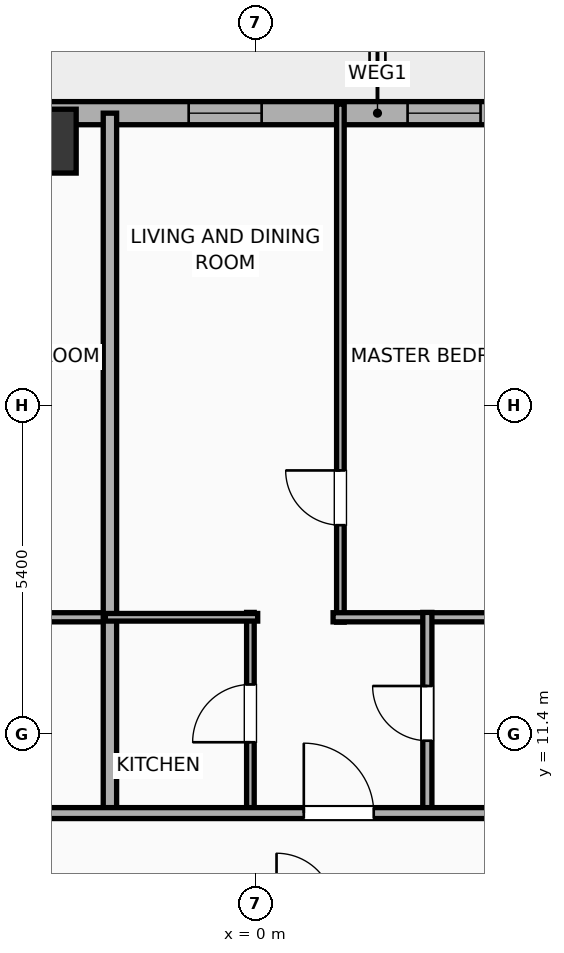
"""IFC4 building model, lengths in metres.
Left out: names, types, materials, properties, quantities, classifications, styles, units other than length and angle.
Written with IfcOpenShell. Run it as: python <this file> out.ifc"""

import sys

from ifc_helpers import new_model, si_unit, direction, frame, frame_2d, origin, origin_2d, place, context, subcontext, project, spatial, rectangle, hollow_rectangle, extrude, element, fill, save


model = new_model("IFC4")
c1 = context("Model", 3, precision=1e-05, world=origin(), true_north=direction((0.0, 1.0)))
c2 = subcontext(c1, "Body", "Model", "MODEL_VIEW")
j1 = project(units=[si_unit("LENGTHUNIT", "METRE"), si_unit("PLANEANGLEUNIT", "RADIAN")], contexts=[c1])
p1 = place(None, origin())
s1 = spatial("IfcSite", under=j1, at=p1, CompositionType="ELEMENT")
p2 = place(p1, origin())
s2 = spatial("IfcBuilding", under=s1, at=p2, CompositionType="ELEMENT")
p3 = place(p2, frame((0.0, 0.0, 113.1)))
s3 = spatial("IfcBuildingStorey", under=s2, at=p3, CompositionType="ELEMENT", Elevation=113.1)
p4 = place(p3, frame((-3.48, 21.15, 0.0), z_axis=(0.0, 0.0, 1.0), x_axis=(1.0, 0.0, 0.0)))
e1 = element("IfcColumn", 1, at=p4, inside=s3, PredefinedType="COLUMN", context=c2, shape_type="SweptSolid", body=[
    extrude(hollow_rectangle(XDim=1.05, YDim=1.05, WallThickness=0.036, at=origin_2d()), origin(), (0.0, 0.0, 1.0), 3.9),
])
p5 = place(p3, frame((-25.381, 21.61, 0.0), z_axis=(0.0, 0.0, 1.0), x_axis=(1.0, 0.0, 0.0)))
e2 = element("IfcWall", 2, at=p5, inside=s3, PredefinedType="ELEMENTEDWALL", context=c2, shape_type="SweptSolid", body=[
    extrude(rectangle(XDim=54.763, YDim=0.38, at=frame_2d((27.381, 0.0))), origin(), (0.0, 0.0, 1.0), 3.65),
])
p6 = place(p5, frame((5.645, 0.0, 0.75)))
e3 = element("IfcOpeningElement", 3, at=p6, cuts=e2, PredefinedType="OPENING", context=c2, shape_type="SweptSolid", body=[
    extrude(rectangle(XDim=2.4, YDim=2.1, at=frame_2d((1.2, 1.05))), frame((0.0, 0.2, 0.0), z_axis=(0.0, -1.0, 0.0), x_axis=(1.0, 0.0, 0.0)), (0.0, 0.0, 1.0), 0.4),
])
p7 = place(p5, frame((34.677, 0.0, 0.75)))
e4 = element("IfcOpeningElement", 4, at=p7, cuts=e2, PredefinedType="OPENING", context=c2, shape_type="SweptSolid", body=[
    extrude(rectangle(XDim=2.4, YDim=2.1, at=frame_2d((1.2, 1.05))), frame((0.0, 0.2, 0.0), z_axis=(0.0, -1.0, 0.0), x_axis=(1.0, 0.0, 0.0)), (0.0, 0.0, 1.0), 0.4),
])
p8 = place(p5, frame((45.067, 0.0, 0.75)))
e5 = element("IfcOpeningElement", 5, at=p8, cuts=e2, PredefinedType="OPENING", context=c2, shape_type="SweptSolid", body=[
    extrude(rectangle(XDim=2.4, YDim=2.1, at=frame_2d((1.2, 1.05))), frame((0.0, 0.2, 0.0), z_axis=(0.0, -1.0, 0.0), x_axis=(1.0, 0.0, 0.0)), (0.0, 0.0, 1.0), 0.4),
])
p9 = place(p5, frame((2.938, 0.0, 0.75)))
e6 = element("IfcOpeningElement", 6, at=p9, cuts=e2, PredefinedType="OPENING", context=c2, shape_type="SweptSolid", body=[
    extrude(rectangle(XDim=1.2, YDim=2.05, at=frame_2d((0.6, 1.025))), frame((0.0, 0.2, 0.0), z_axis=(0.0, -1.0, 0.0), x_axis=(1.0, 0.0, 0.0)), (0.0, 0.0, 1.0), 0.4),
])
p10 = place(p5, frame((8.916, 0.0, 0.75)))
e7 = element("IfcOpeningElement", 7, at=p10, cuts=e2, PredefinedType="OPENING", context=c2, shape_type="SweptSolid", body=[
    extrude(rectangle(XDim=1.2, YDim=2.05, at=frame_2d((0.6, 1.025))), frame((0.0, 0.2, 0.0), z_axis=(0.0, -1.0, 0.0), x_axis=(1.0, 0.0, 0.0)), (0.0, 0.0, 1.0), 0.4),
])
p11 = place(p5, frame((13.476, 0.0, 0.75)))
e8 = element("IfcOpeningElement", 8, at=p11, cuts=e2, PredefinedType="OPENING", context=c2, shape_type="SweptSolid", body=[
    extrude(rectangle(XDim=1.2, YDim=2.05, at=frame_2d((0.6, 1.025))), frame((0.0, 0.2, 0.0), z_axis=(0.0, -1.0, 0.0), x_axis=(1.0, 0.0, 0.0)), (0.0, 0.0, 1.0), 0.4),
])
p12 = place(p5, frame((17.076, 0.0, 0.75)))
e9 = element("IfcOpeningElement", 9, at=p12, cuts=e2, PredefinedType="OPENING", context=c2, shape_type="SweptSolid", body=[
    extrude(rectangle(XDim=1.2, YDim=2.05, at=frame_2d((0.6, 1.025))), frame((0.0, 0.2, 0.0), z_axis=(0.0, -1.0, 0.0), x_axis=(1.0, 0.0, 0.0)), (0.0, 0.0, 1.0), 0.4),
])
p13 = place(p5, frame((19.956, 0.0, 0.75)))
e10 = element("IfcOpeningElement", 10, at=p13, cuts=e2, PredefinedType="OPENING", context=c2, shape_type="SweptSolid", body=[
    extrude(rectangle(XDim=1.2, YDim=2.05, at=frame_2d((0.6, 1.025))), frame((0.0, 0.2, 0.0), z_axis=(0.0, -1.0, 0.0), x_axis=(1.0, 0.0, 0.0)), (0.0, 0.0, 1.0), 0.4),
])
p14 = place(p5, frame((24.276, 0.0, 0.75)))
e11 = element("IfcOpeningElement", 11, at=p14, cuts=e2, PredefinedType="OPENING", context=c2, shape_type="SweptSolid", body=[
    extrude(rectangle(XDim=1.2, YDim=2.05, at=frame_2d((0.6, 1.025))), frame((0.0, 0.2, 0.0), z_axis=(0.0, -1.0, 0.0), x_axis=(1.0, 0.0, 0.0)), (0.0, 0.0, 1.0), 0.4),
])
p15 = place(p5, frame((27.876, 0.0, 0.75)))
e12 = element("IfcOpeningElement", 12, at=p15, cuts=e2, PredefinedType="OPENING", context=c2, shape_type="SweptSolid", body=[
    extrude(rectangle(XDim=1.2, YDim=2.05, at=frame_2d((0.6, 1.025))), frame((0.0, 0.2, 0.0), z_axis=(0.0, -1.0, 0.0), x_axis=(1.0, 0.0, 0.0)), (0.0, 0.0, 1.0), 0.4),
])
p16 = place(p5, frame((30.876, 0.0, 0.75)))
e13 = element("IfcOpeningElement", 13, at=p16, cuts=e2, PredefinedType="OPENING", context=c2, shape_type="SweptSolid", body=[
    extrude(rectangle(XDim=1.2, YDim=2.05, at=frame_2d((0.6, 1.025))), frame((0.0, 0.2, 0.0), z_axis=(0.0, -1.0, 0.0), x_axis=(1.0, 0.0, 0.0)), (0.0, 0.0, 1.0), 0.4),
])
p17 = place(p5, frame((38.676, 0.0, 0.75)))
e14 = element("IfcOpeningElement", 14, at=p17, cuts=e2, PredefinedType="OPENING", context=c2, shape_type="SweptSolid", body=[
    extrude(rectangle(XDim=1.2, YDim=2.05, at=frame_2d((0.6, 1.025))), frame((0.0, 0.2, 0.0), z_axis=(0.0, -1.0, 0.0), x_axis=(1.0, 0.0, 0.0)), (0.0, 0.0, 1.0), 0.4),
])
p18 = place(p5, frame((41.796, 0.0, 0.75)))
e15 = element("IfcOpeningElement", 15, at=p18, cuts=e2, PredefinedType="OPENING", context=c2, shape_type="SweptSolid", body=[
    extrude(rectangle(XDim=1.2, YDim=2.05, at=frame_2d((0.6, 1.025))), frame((0.0, 0.2, 0.0), z_axis=(0.0, -1.0, 0.0), x_axis=(1.0, 0.0, 0.0)), (0.0, 0.0, 1.0), 0.4),
])
p19 = place(p5, frame((49.476, 0.0, 0.75)))
e16 = element("IfcOpeningElement", 16, at=p19, cuts=e2, PredefinedType="OPENING", context=c2, shape_type="SweptSolid", body=[
    extrude(rectangle(XDim=1.2, YDim=2.05, at=frame_2d((0.6, 1.025))), frame((0.0, 0.2, 0.0), z_axis=(0.0, -1.0, 0.0), x_axis=(1.0, 0.0, 0.0)), (0.0, 0.0, 1.0), 0.4),
])
p20 = place(p5, frame((52.227, 0.0, 0.75)))
e17 = element("IfcOpeningElement", 17, at=p20, cuts=e2, PredefinedType="OPENING", context=c2, shape_type="SweptSolid", body=[
    extrude(rectangle(XDim=1.2, YDim=2.05, at=frame_2d((0.6, 1.025))), frame((0.0, 0.2, 0.0), z_axis=(0.0, -1.0, 0.0), x_axis=(1.0, 0.0, 0.0)), (0.0, 0.0, 1.0), 0.4),
])
p21 = place(p3, frame((-5.93, 13.32, 0.0), z_axis=(0.0, 0.0, 1.0), x_axis=(1.0, 0.0, 0.0)))
e18 = element("IfcWall", 18, at=p21, inside=s3, PredefinedType="PLUMBINGWALL", context=c2, shape_type="SweptSolid", body=[
    extrude(rectangle(XDim=3.605, YDim=0.15, at=frame_2d((1.802, 0.0))), origin(), (0.0, 0.0, 1.0), 3.65),
])
p22 = place(p3, frame((-2.4, 10.02, 0.0), z_axis=(0.0, 0.0, 1.0), x_axis=(0.0, 1.0, 0.0)))
e19 = element("IfcWall", 19, at=p22, inside=s3, PredefinedType="PARTITIONING", context=c2, shape_type="SweptSolid", body=[
    extrude(rectangle(XDim=11.59, YDim=0.22, at=frame_2d((5.795, 0.0))), origin(), (0.0, 0.0, 1.0), 3.65),
])
p23 = place(p3, frame((1.39, 13.24, 0.0), z_axis=(0.0, 0.0, 1.0), x_axis=(0.0, 1.0, 0.0)))
e20 = element("IfcWall", 20, at=p23, inside=s3, PredefinedType="PARTITIONING", context=c2, shape_type="SweptSolid", body=[
    extrude(rectangle(XDim=8.52, YDim=0.125, at=frame_2d((4.26, 0.0))), origin(), (0.0, 0.0, 1.0), 3.65),
])
p24 = place(p23, frame((1.595, 0.0, 0.0)))
e21 = element("IfcOpeningElement", 21, at=p24, cuts=e20, PredefinedType="OPENING", context=c2, shape_type="SweptSolid", body=[
    extrude(rectangle(XDim=0.9, YDim=2.05, at=frame_2d((0.45, 1.025))), frame((0.0, 0.073, 0.0), z_axis=(0.0, -1.0, 0.0), x_axis=(1.0, 0.0, 0.0)), (0.0, 0.0, 1.0), 0.145),
])
p25 = place(p3, frame((1.27, 13.32, 0.0), z_axis=(0.0, 0.0, 1.0), x_axis=(1.0, 0.0, 0.0)))
e22 = element("IfcWall", 22, at=p25, inside=s3, PredefinedType="PLUMBINGWALL", context=c2, shape_type="SweptSolid", body=[
    extrude(rectangle(XDim=3.605, YDim=0.15, at=frame_2d((1.802, 0.0))), origin(), (0.0, 0.0, 1.0), 3.65),
])
p26 = place(p3, frame((-0.09, 10.08, 0.0), z_axis=(0.0, 0.0, 1.0), x_axis=(0.0, 1.0, 0.0)))
e23 = element("IfcWall", 23, at=p26, inside=s3, PredefinedType="PARTITIONING", context=c2, shape_type="SweptSolid", body=[
    extrude(rectangle(XDim=3.32, YDim=0.125, at=frame_2d((1.66, 0.0))), origin(), (0.0, 0.0, 1.0), 3.65),
])
p27 = place(p26, frame((1.185, 0.0, 0.0)))
e24 = element("IfcOpeningElement", 24, at=p27, cuts=e23, PredefinedType="OPENING", context=c2, shape_type="SweptSolid", body=[
    extrude(rectangle(XDim=0.95, YDim=2.05, at=frame_2d((0.475, 1.025))), frame((0.0, 0.073, 0.0), z_axis=(0.0, -1.0, 0.0), x_axis=(1.0, 0.0, 0.0)), (0.0, 0.0, 1.0), 0.145),
])
p28 = place(p3, frame((-2.475, 13.32, 0.0), z_axis=(0.0, 0.0, 1.0), x_axis=(1.0, 0.0, 0.0)))
e25 = element("IfcWall", 25, at=p28, inside=s3, PredefinedType="PARTITIONING", context=c2, shape_type="SweptSolid", body=[
    extrude(rectangle(XDim=2.505, YDim=0.125, at=frame_2d((1.252, 0.0))), origin(), (0.0, 0.0, 1.0), 3.65),
])
p29 = place(p3, frame((2.82, 10.08, 0.0), z_axis=(0.0, 0.0, 1.0), x_axis=(0.0, 1.0, 0.0)))
e26 = element("IfcWall", 26, at=p29, inside=s3, PredefinedType="PLUMBINGWALL", context=c2, shape_type="SweptSolid", body=[
    extrude(rectangle(XDim=3.32, YDim=0.15, at=frame_2d((1.66, 0.0))), origin(), (0.0, 0.0, 1.0), 3.65),
])
p30 = place(p29, frame((1.21, 0.0, 0.0)))
e27 = element("IfcOpeningElement", 27, at=p30, cuts=e26, PredefinedType="OPENING", context=c2, shape_type="SweptSolid", body=[
    extrude(rectangle(XDim=0.9, YDim=2.05, at=frame_2d((0.45, 1.025))), frame((0.0, 0.085, 0.0), z_axis=(0.0, -1.0, 0.0), x_axis=(1.0, 0.0, 0.0)), (0.0, 0.0, 1.0), 0.17),
])
p31 = place(p3, frame((-29.21, 10.1, 0.0), z_axis=(0.0, 0.0, 1.0), x_axis=(1.0, 0.0, 0.0)))
e28 = element("IfcWall", 28, at=p31, inside=s3, PredefinedType="PARTITIONING", context=c2, shape_type="SweptSolid", body=[
    extrude(rectangle(XDim=62.42, YDim=0.18, at=frame_2d((31.21, 0.0))), origin(), (0.0, 0.0, 1.0), 3.65),
])
p32 = place(p31, frame((2.74, 0.0, 0.0)))
e29 = element("IfcOpeningElement", 29, at=p32, cuts=e28, PredefinedType="OPENING", context=c2, shape_type="SweptSolid", body=[
    extrude(rectangle(XDim=0.9, YDim=2.05, at=frame_2d((0.45, 1.025))), frame((0.0, 0.1, 0.0), z_axis=(0.0, -1.0, 0.0), x_axis=(1.0, 0.0, 0.0)), (0.0, 0.0, 1.0), 0.2),
])
p33 = place(p31, frame((9.868, 0.0, 0.0)))
e30 = element("IfcOpeningElement", 30, at=p33, cuts=e28, PredefinedType="OPENING", context=c2, shape_type="SweptSolid", body=[
    extrude(rectangle(XDim=1.15, YDim=2.05, at=frame_2d((0.575, 1.025))), frame((0.0, 0.1, 0.0), z_axis=(0.0, -1.0, 0.0), x_axis=(1.0, 0.0, 0.0)), (0.0, 0.0, 1.0), 0.2),
])
p34 = place(p31, frame((15.598, 0.0, 0.0)))
e31 = element("IfcOpeningElement", 31, at=p34, cuts=e28, PredefinedType="OPENING", context=c2, shape_type="SweptSolid", body=[
    extrude(rectangle(XDim=1.15, YDim=2.05, at=frame_2d((0.575, 1.025))), frame((0.0, 0.1, 0.0), z_axis=(0.0, -1.0, 0.0), x_axis=(1.0, 0.0, 0.0)), (0.0, 0.0, 1.0), 0.2),
])
p35 = place(p31, frame((22.801, 0.0, 0.0)))
e32 = element("IfcOpeningElement", 32, at=p35, cuts=e28, PredefinedType="OPENING", context=c2, shape_type="SweptSolid", body=[
    extrude(rectangle(XDim=1.15, YDim=2.05, at=frame_2d((0.575, 1.025))), frame((0.0, 0.1, 0.0), z_axis=(0.0, -1.0, 0.0), x_axis=(1.0, 0.0, 0.0)), (0.0, 0.0, 1.0), 0.2),
])
p36 = place(p31, frame((29.998, 0.0, 0.0)))
e33 = element("IfcOpeningElement", 33, at=p36, cuts=e28, PredefinedType="OPENING", context=c2, shape_type="SweptSolid", body=[
    extrude(rectangle(XDim=1.15, YDim=2.05, at=frame_2d((0.575, 1.025))), frame((0.0, 0.1, 0.0), z_axis=(0.0, -1.0, 0.0), x_axis=(1.0, 0.0, 0.0)), (0.0, 0.0, 1.0), 0.2),
])
p37 = place(p31, frame((37.202, 0.0, 0.0)))
e34 = element("IfcOpeningElement", 34, at=p37, cuts=e28, PredefinedType="OPENING", context=c2, shape_type="SweptSolid", body=[
    extrude(rectangle(XDim=1.15, YDim=2.05, at=frame_2d((0.575, 1.025))), frame((0.0, 0.1, 0.0), z_axis=(0.0, -1.0, 0.0), x_axis=(1.0, 0.0, 0.0)), (0.0, 0.0, 1.0), 0.2),
])
p38 = place(p31, frame((44.399, 0.0, 0.0)))
e35 = element("IfcOpeningElement", 35, at=p38, cuts=e28, PredefinedType="OPENING", context=c2, shape_type="SweptSolid", body=[
    extrude(rectangle(XDim=1.15, YDim=2.05, at=frame_2d((0.575, 1.025))), frame((0.0, 0.1, 0.0), z_axis=(0.0, -1.0, 0.0), x_axis=(1.0, 0.0, 0.0)), (0.0, 0.0, 1.0), 0.2),
])
p39 = place(p31, frame((51.602, 0.0, 0.0)))
e36 = element("IfcOpeningElement", 36, at=p39, cuts=e28, PredefinedType="OPENING", context=c2, shape_type="SweptSolid", body=[
    extrude(rectangle(XDim=1.15, YDim=2.05, at=frame_2d((0.575, 1.025))), frame((0.0, 0.1, 0.0), z_axis=(0.0, -1.0, 0.0), x_axis=(1.0, 0.0, 0.0)), (0.0, 0.0, 1.0), 0.2),
])
p40 = place(p31, frame((58.762, 0.0, 0.0)))
e37 = element("IfcOpeningElement", 37, at=p40, cuts=e28, PredefinedType="OPENING", context=c2, shape_type="SweptSolid", body=[
    extrude(rectangle(XDim=0.9, YDim=2.05, at=frame_2d((0.45, 1.025))), frame((0.0, 0.1, 0.0), z_axis=(0.0, -1.0, 0.0), x_axis=(1.0, 0.0, 0.0)), (0.0, 0.0, 1.0), 0.2),
])
p41 = place(p14, origin())
e38 = element("IfcWindow", 38, at=p41, inside=s3, PartitioningType="SINGLE_PANEL", PredefinedType="WINDOW", context=c2, shape_type="SweptSolid", body=[
    extrude(rectangle(XDim=1.2, YDim=2.05, at=frame_2d((0.6, 1.025))), frame((0.0, 0.03, 0.0), z_axis=(0.0, -1.0, 0.0), x_axis=(1.0, 0.0, 0.0)), (0.0, 0.0, 1.0), 0.06),
])
fill(e11, e38)
p42 = place(p15, origin())
e39 = element("IfcWindow", 39, at=p42, inside=s3, PartitioningType="SINGLE_PANEL", PredefinedType="WINDOW", context=c2, shape_type="SweptSolid", body=[
    extrude(rectangle(XDim=1.2, YDim=2.05, at=frame_2d((0.6, 1.025))), frame((0.0, 0.03, 0.0), z_axis=(0.0, -1.0, 0.0), x_axis=(1.0, 0.0, 0.0)), (0.0, 0.0, 1.0), 0.06),
])
fill(e12, e39)
p43 = place(p24, origin())
e40 = element("IfcDoor", 40, at=p43, inside=s3, OperationType="SINGLE_SWING_RIGHT", PredefinedType="DOOR", context=c2, shape_type="SweptSolid", body=[
    extrude(rectangle(XDim=0.9, YDim=2.05, at=frame_2d((0.45, 1.025))), frame((0.0, 0.025, 0.0), z_axis=(0.0, -1.0, 0.0), x_axis=(1.0, 0.0, 0.0)), (0.0, 0.0, 1.0), 0.05),
])
fill(e21, e40)
p44 = place(p27, origin())
e41 = element("IfcDoor", 41, at=p44, inside=s3, OperationType="SINGLE_SWING_LEFT", PredefinedType="DOOR", context=c2, shape_type="SweptSolid", body=[
    extrude(rectangle(XDim=0.95, YDim=2.05, at=frame_2d((0.475, 1.025))), frame((0.0, 0.025, 0.0), z_axis=(0.0, -1.0, 0.0), x_axis=(1.0, 0.0, 0.0)), (0.0, 0.0, 1.0), 0.05),
])
fill(e24, e41)
p45 = place(p30, origin())
e42 = element("IfcDoor", 42, at=p45, inside=s3, OperationType="SINGLE_SWING_RIGHT", PredefinedType="DOOR", context=c2, shape_type="SweptSolid", body=[
    extrude(rectangle(XDim=0.9, YDim=2.05, at=frame_2d((0.45, 1.025))), frame((0.0, 0.025, 0.0), z_axis=(0.0, -1.0, 0.0), x_axis=(1.0, 0.0, 0.0)), (0.0, 0.0, 1.0), 0.05),
])
fill(e27, e42)
p46 = place(p36, origin())
e43 = element("IfcDoor", 43, at=p46, inside=s3, OperationType="SINGLE_SWING_LEFT", PredefinedType="DOOR", context=c2, shape_type="SweptSolid", body=[
    extrude(rectangle(XDim=1.15, YDim=2.05, at=frame_2d((0.575, 1.025))), frame((0.0, 0.025, 0.0), z_axis=(0.0, -1.0, 0.0), x_axis=(1.0, 0.0, 0.0)), (0.0, 0.0, 1.0), 0.05),
])
fill(e33, e43)
save(model, sys.argv[1])
